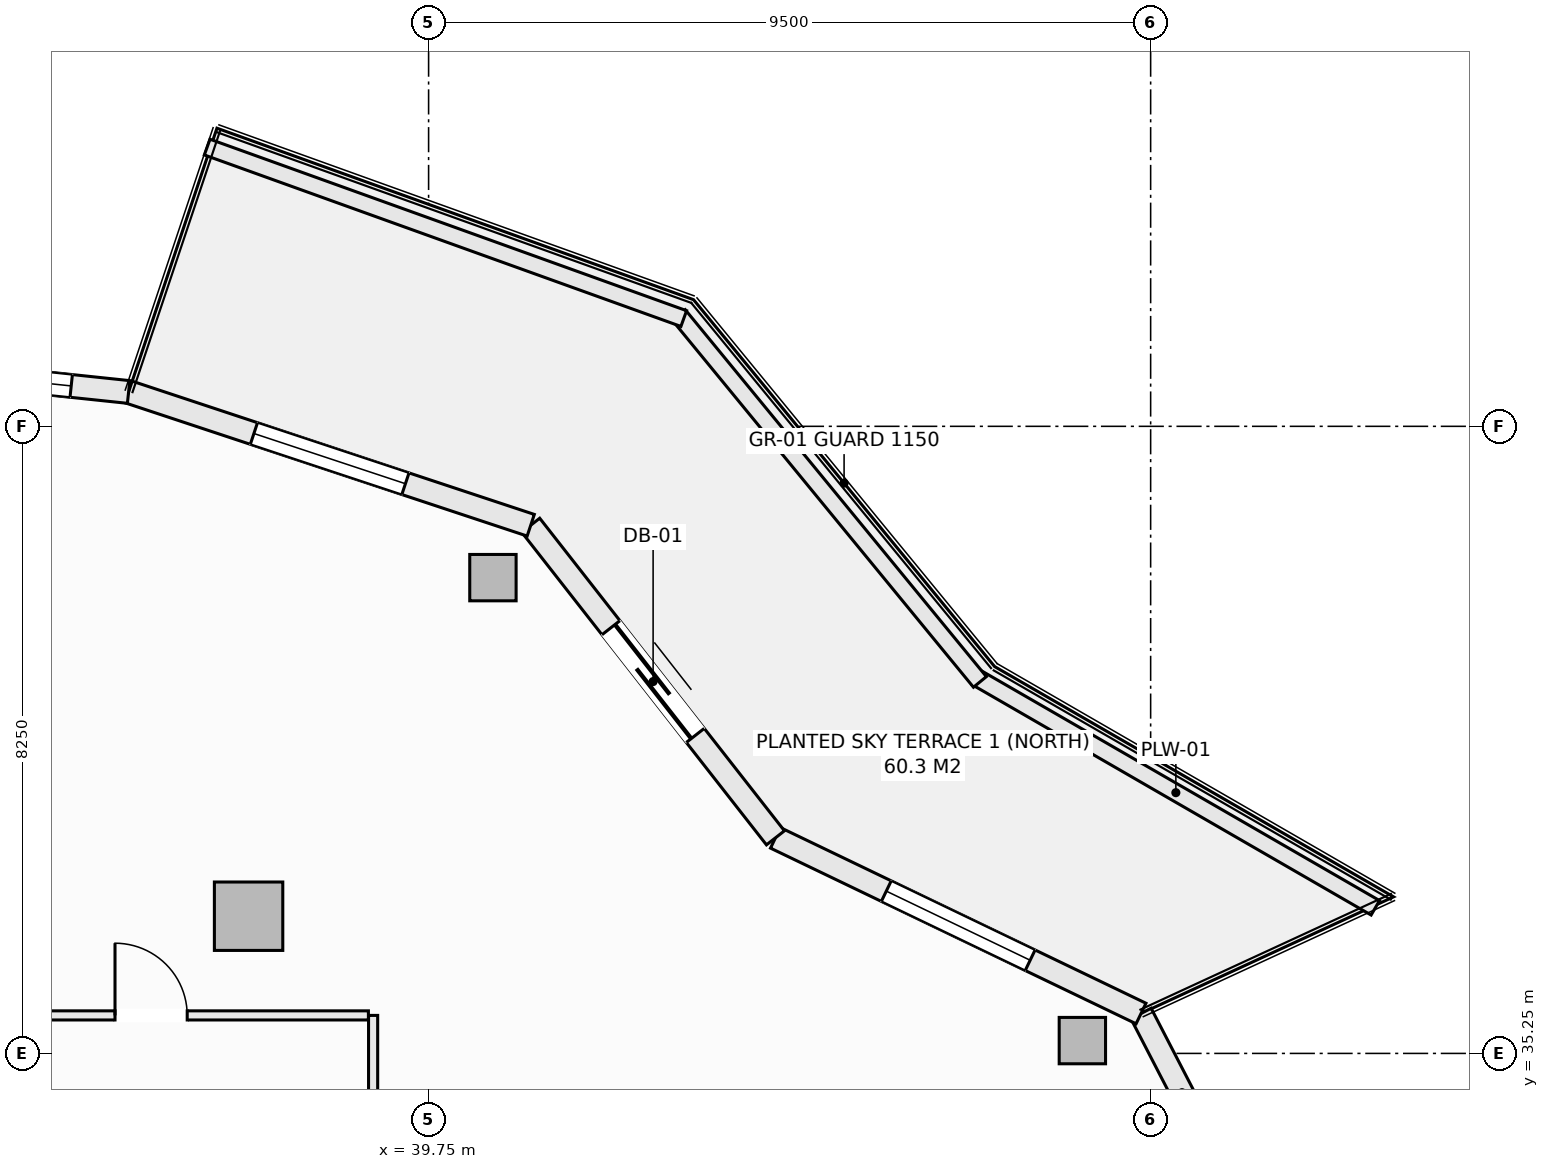
"""IFC4 building model, lengths in metres.
Left out: names, types, materials, properties, quantities, classifications, styles, units other than length and angle.
Written with IfcOpenShell. Run it as: python <this file> out.ifc"""

import sys

from ifc_helpers import new_model, si_unit, direction, frame, frame_2d, origin, origin_2d, place, context, subcontext, project, spatial, rectangle, hollow_rectangle, extrude, element, fill, save


model = new_model("IFC4")
c1 = context("Model", 3, precision=1e-05, world=origin(), true_north=direction((0.0, 1.0)))
c2 = subcontext(c1, "Body", "Model", "MODEL_VIEW")
j1 = project(units=[si_unit("LENGTHUNIT", "METRE"), si_unit("PLANEANGLEUNIT", "RADIAN")], contexts=[c1])
p1 = place(None, origin())
s1 = spatial("IfcSite", under=j1, at=p1, CompositionType="ELEMENT")
p2 = place(p1, origin())
s2 = spatial("IfcBuilding", under=s1, at=p2, CompositionType="ELEMENT")
p3 = place(p2, frame((0.0, 0.0, 159.7)))
s3 = spatial("IfcBuildingStorey", under=s2, at=p3, CompositionType="ELEMENT", Elevation=159.7)
for number, where, z_axis, x_axis in (
    (1, (48.352, 35.419, -0.27), (0.0, 0.0, 1.0), (1.0, 0.0, 0.0)),
    (2, (40.596, 41.51, -0.27), (0.0, 0.0, 1.0), (1.0, 0.0, 0.0)),
):
    element("IfcColumn", number, at=place(p3, frame(where, z_axis=z_axis, x_axis=x_axis)), inside=s3, PredefinedType="COLUMN", context=c2, shape_type="SweptSolid", body=[
        extrude(hollow_rectangle(XDim=0.61, YDim=0.61, WallThickness=0.025, at=origin_2d()), origin(), (0.0, 0.0, 1.0), 3.4),
    ])
p4 = place(p3, frame((37.382, 37.055, -0.27), z_axis=(0.0, 0.0, 1.0), x_axis=(1.0, 0.0, 0.0)))
e3 = element("IfcColumn", 3, at=p4, inside=s3, PredefinedType="COLUMN", context=c2, shape_type="SweptSolid", body=[
    extrude(rectangle(XDim=0.9, YDim=0.9, at=origin_2d()), origin(), (0.0, 0.0, 1.0), 3.4),
])
p5 = place(p3, frame((49.123, 35.775, 0.0), z_axis=(0.0, 0.0, 1.0), x_axis=(0.459810251451, -0.888017191647, 0.0)))
e4 = element("IfcWall", 4, at=p5, inside=s3, PredefinedType="SOLIDWALL", context=c2, shape_type="SweptSolid", body=[
    extrude(rectangle(XDim=4.766, YDim=0.3, at=frame_2d((2.383, 0.0))), origin(), (0.0, 0.0, 1.0), 2.653),
])
p6 = place(p5, frame((1.333, 0.0, 0.74)))
e5 = element("IfcOpeningElement", 5, at=p6, cuts=e4, PredefinedType="OPENING", context=c2, shape_type="SweptSolid", body=[
    extrude(rectangle(XDim=2.1, YDim=1.7, at=frame_2d((1.05, 0.85))), frame((0.0, 0.16, 0.0), z_axis=(0.0, -1.0, 0.0), x_axis=(1.0, 0.0, 0.0)), (0.0, 0.0, 1.0), 0.32),
])
p7 = place(p3, frame((44.313, 38.086, 0.0), z_axis=(0.0, 0.0, 1.0), x_axis=(0.901353070301, -0.433085029363, 0.0)))
e6 = element("IfcWall", 6, at=p7, inside=s3, PredefinedType="SOLIDWALL", context=c2, shape_type="SweptSolid", body=[
    extrude(rectangle(XDim=5.336, YDim=0.3, at=frame_2d((2.668, 0.0))), origin(), (0.0, 0.0, 1.0), 2.653),
])
p8 = place(p7, frame((1.618, 0.0, 0.74)))
e7 = element("IfcOpeningElement", 7, at=p8, cuts=e6, PredefinedType="OPENING", context=c2, shape_type="SweptSolid", body=[
    extrude(rectangle(XDim=2.1, YDim=1.7, at=frame_2d((1.05, 0.85))), frame((0.0, 0.16, 0.0), z_axis=(0.0, -1.0, 0.0), x_axis=(1.0, 0.0, 0.0)), (0.0, 0.0, 1.0), 0.32),
])
p9 = place(p3, frame((41.094, 42.199, 0.0), z_axis=(0.0, 0.0, 1.0), x_axis=(0.616429245738, -0.787410302828, 0.0)))
e8 = element("IfcWall", 8, at=p9, inside=s3, PredefinedType="SOLIDWALL", context=c2, shape_type="SweptSolid", body=[
    extrude(rectangle(XDim=5.223, YDim=0.3, at=frame_2d((2.612, 0.0))), origin(), (0.0, 0.0, 1.0), 2.653),
])
p10 = place(p9, frame((1.712, 0.0, 0.0)))
e9 = element("IfcOpeningElement", 9, at=p10, cuts=e8, PredefinedType="OPENING", context=c2, shape_type="SweptSolid", body=[
    extrude(rectangle(XDim=1.8, YDim=2.25, at=frame_2d((0.9, 1.125))), frame((0.0, 0.16, 0.0), z_axis=(0.0, -1.0, 0.0), x_axis=(1.0, 0.0, 0.0)), (0.0, 0.0, 1.0), 0.32),
])
p11 = place(p3, frame((35.803, 43.952, 0.0), z_axis=(0.0, 0.0, 1.0), x_axis=(0.949246811547, -0.314532177636, 0.0)))
e10 = element("IfcWall", 10, at=p11, inside=s3, PredefinedType="SOLIDWALL", context=c2, shape_type="SweptSolid", body=[
    extrude(rectangle(XDim=5.574, YDim=0.3, at=frame_2d((2.787, 0.0))), origin(), (0.0, 0.0, 1.0), 2.653),
])
p12 = place(p11, frame((1.737, 0.0, 0.74)))
e11 = element("IfcOpeningElement", 11, at=p12, cuts=e10, PredefinedType="OPENING", context=c2, shape_type="SweptSolid", body=[
    extrude(rectangle(XDim=2.1, YDim=1.7, at=frame_2d((1.05, 0.85))), frame((0.0, 0.16, 0.0), z_axis=(0.0, -1.0, 0.0), x_axis=(1.0, 0.0, 0.0)), (0.0, 0.0, 1.0), 0.32),
])
p13 = place(p3, frame((30.125, 44.55, 0.0), z_axis=(0.0, 0.0, 1.0), x_axis=(0.994496545245, -0.104769372887, 0.0)))
e12 = element("IfcWall", 12, at=p13, inside=s3, PredefinedType="SOLIDWALL", context=c2, shape_type="SweptSolid", body=[
    extrude(rectangle(XDim=5.709, YDim=0.3, at=frame_2d((2.854, 0.0))), origin(), (0.0, 0.0, 1.0), 2.653),
])
p14 = place(p13, frame((2.85, 0.0, 0.74)))
e13 = element("IfcOpeningElement", 13, at=p14, cuts=e12, PredefinedType="OPENING", context=c2, shape_type="SweptSolid", body=[
    extrude(rectangle(XDim=2.1, YDim=1.7, at=frame_2d((1.05, 0.85))), frame((0.0, 0.16, 0.0), z_axis=(0.0, -1.0, 0.0), x_axis=(1.0, 0.0, 0.0)), (0.0, 0.0, 1.0), 0.32),
])
p15 = place(p3, frame((46.958, 40.195, 0.0), z_axis=(0.0, 0.0, 1.0), x_axis=(0.866058128659, -0.499943314571, 0.0)))
e14 = element("IfcWall", 14, at=p15, inside=s3, PredefinedType="PARAPET", context=c2, shape_type="SweptSolid", body=[
    extrude(rectangle(XDim=6.06, YDim=0.22, at=frame_2d((3.03, 0.0))), origin(), (0.0, 0.0, 1.0), 0.52),
])
p16 = place(p3, frame((43.042, 44.964, 0.0), z_axis=(0.0, 0.0, 1.0), x_axis=(0.634429234628, -0.77298094818, 0.0)))
e15 = element("IfcWall", 15, at=p16, inside=s3, PredefinedType="PARAPET", context=c2, shape_type="SweptSolid", body=[
    extrude(rectangle(XDim=6.245, YDim=0.22, at=frame_2d((3.123, 0.0))), origin(), (0.0, 0.0, 1.0), 0.52),
])
p17 = place(p3, frame((36.837, 47.174, 0.0), z_axis=(0.0, 0.0, 1.0), x_axis=(0.940948576924, -0.338549517184, 0.0)))
e16 = element("IfcWall", 16, at=p17, inside=s3, PredefinedType="PARAPET", context=c2, shape_type="SweptSolid", body=[
    extrude(rectangle(XDim=6.664, YDim=0.22, at=frame_2d((3.332, 0.0))), origin(), (0.0, 0.0, 1.0), 0.52),
])
p18 = place(p3, frame((39.02, 33.75, 0.0), z_axis=(0.0, 0.0, 1.0), x_axis=(0.0, 1.0, 0.0)))
e17 = element("IfcWall", 17, at=p18, inside=s3, PredefinedType="PARTITIONING", context=c2, shape_type="SweptSolid", body=[
    extrude(rectangle(XDim=2.0, YDim=0.12, at=frame_2d((1.0, 0.0))), origin(), (0.0, 0.0, 1.0), 3.13),
])
p19 = place(p3, frame((34.08, 35.75, 0.0), z_axis=(0.0, 0.0, 1.0), x_axis=(1.0, 0.0, 0.0)))
e18 = element("IfcWall", 18, at=p19, inside=s3, PredefinedType="PARTITIONING", context=c2, shape_type="SweptSolid", body=[
    extrude(rectangle(XDim=4.878, YDim=0.12, at=frame_2d((2.439, 0.0))), origin(), (0.0, 0.0, 1.0), 2.505),
])
p20 = place(p19, frame((1.544, 0.0, 0.0)))
e19 = element("IfcOpeningElement", 19, at=p20, cuts=e18, PredefinedType="OPENING", context=c2, shape_type="SweptSolid", body=[
    extrude(rectangle(XDim=0.95, YDim=2.1, at=frame_2d((0.475, 1.05))), frame((0.0, 0.07, 0.0), z_axis=(0.0, -1.0, 0.0), x_axis=(1.0, 0.0, 0.0)), (0.0, 0.0, 1.0), 0.14),
])
p21 = place(p8, origin())
e20 = element("IfcWindow", 20, at=p21, inside=s3, PartitioningType="SINGLE_PANEL", PredefinedType="WINDOW", context=c2, shape_type="SweptSolid", body=[
    extrude(rectangle(XDim=2.1, YDim=1.7, at=frame_2d((1.05, 0.85))), frame((0.0, 0.03, 0.0), z_axis=(0.0, -1.0, 0.0), x_axis=(1.0, 0.0, 0.0)), (0.0, 0.0, 1.0), 0.06),
])
fill(e7, e20)
p22 = place(p10, origin())
e21 = element("IfcDoor", 21, at=p22, inside=s3, OperationType="SLIDING_TO_LEFT", PredefinedType="DOOR", context=c2, shape_type="SweptSolid", body=[
    extrude(rectangle(XDim=1.8, YDim=2.25, at=frame_2d((0.9, 1.125))), frame((0.0, 0.025, 0.0), z_axis=(0.0, -1.0, 0.0), x_axis=(1.0, 0.0, 0.0)), (0.0, 0.0, 1.0), 0.05),
])
fill(e9, e21)
p23 = place(p12, origin())
e22 = element("IfcWindow", 22, at=p23, inside=s3, PartitioningType="SINGLE_PANEL", PredefinedType="WINDOW", context=c2, shape_type="SweptSolid", body=[
    extrude(rectangle(XDim=2.1, YDim=1.7, at=frame_2d((1.05, 0.85))), frame((0.0, 0.03, 0.0), z_axis=(0.0, -1.0, 0.0), x_axis=(1.0, 0.0, 0.0)), (0.0, 0.0, 1.0), 0.06),
])
fill(e11, e22)
p24 = place(p14, origin())
e23 = element("IfcWindow", 23, at=p24, inside=s3, PartitioningType="SINGLE_PANEL", PredefinedType="WINDOW", context=c2, shape_type="SweptSolid", body=[
    extrude(rectangle(XDim=2.1, YDim=1.7, at=frame_2d((1.05, 0.85))), frame((0.0, 0.03, 0.0), z_axis=(0.0, -1.0, 0.0), x_axis=(1.0, 0.0, 0.0)), (0.0, 0.0, 1.0), 0.06),
])
fill(e13, e23)
p25 = place(p20, origin())
e24 = element("IfcDoor", 24, at=p25, inside=s3, OperationType="SINGLE_SWING_LEFT", PredefinedType="DOOR", context=c2, shape_type="SweptSolid", body=[
    extrude(rectangle(XDim=0.95, YDim=2.1, at=frame_2d((0.475, 1.05))), frame((0.0, 0.025, 0.0), z_axis=(0.0, -1.0, 0.0), x_axis=(1.0, 0.0, 0.0)), (0.0, 0.0, 1.0), 0.05),
])
fill(e19, e24)
save(model, sys.argv[1])
